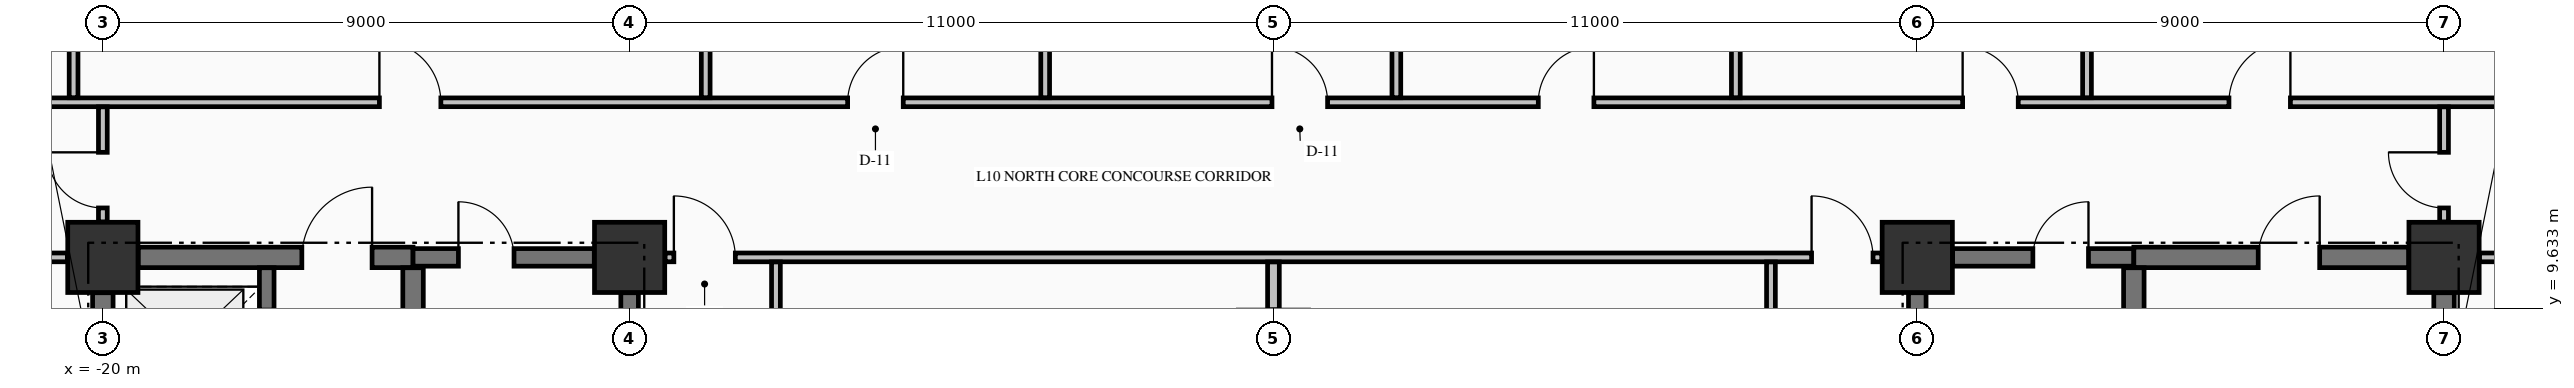
"""IFC4 building model, lengths in metres.
Left out: names, types, materials, properties, quantities, classifications, styles, units other than length and angle.
Written with IfcOpenShell. Run it as: python <this file> out.ifc"""

import sys

from ifc_helpers import new_model, si_unit, direction, frame, frame_2d, origin, origin_2d, place, context, subcontext, project, spatial, rectangle, extrude, element, fill, save


model = new_model("IFC4")
c1 = context("Model", 3, precision=1e-05, world=origin(), true_north=direction((0.0, 1.0)))
c2 = subcontext(c1, "Body", "Model", "MODEL_VIEW")
j1 = project(units=[si_unit("LENGTHUNIT", "METRE"), si_unit("PLANEANGLEUNIT", "RADIAN")], contexts=[c1])
p1 = place(None, origin())
s1 = spatial("IfcSite", under=j1, at=p1, CompositionType="ELEMENT")
p2 = place(p1, origin())
s2 = spatial("IfcBuilding", under=s1, at=p2, CompositionType="ELEMENT")
p3 = place(p2, frame((0.0, 0.0, 45.05)))
s3 = spatial("IfcBuildingStorey", under=s2, at=p3, CompositionType="ELEMENT", Elevation=45.05)
for number, where, z_axis, x_axis in (
    (1, (-20.0, 10.5, -0.25), (0.0, 0.0, 1.0), (1.0, 0.0, 0.0)),
    (2, (-11.0, 10.5, -0.25), (0.0, 0.0, 1.0), (1.0, 0.0, 0.0)),
    (3, (11.0, 10.5, -0.25), (0.0, 0.0, 1.0), (1.0, 0.0, 0.0)),
    (4, (20.0, 10.5, -0.25), (0.0, 0.0, 1.0), (1.0, 0.0, 0.0)),
):
    element("IfcColumn", number, at=place(p3, frame(where, z_axis=z_axis, x_axis=x_axis)), inside=s3, PredefinedType="COLUMN", context=c2, shape_type="SweptSolid", body=[
        extrude(rectangle(XDim=1.2, YDim=1.2, at=origin_2d()), origin(), (0.0, 0.0, 1.0), 3.57),
    ])
p4 = place(p3, frame((-19.396, 10.5, 0.0), z_axis=(0.0, 0.0, 1.0), x_axis=(1.0, 0.0, 0.0)))
e5 = element("IfcWall", 5, at=p4, inside=s3, PredefinedType="SHEAR", context=c2, shape_type="SweptSolid", body=[
    extrude(rectangle(XDim=4.696, YDim=0.35, at=frame_2d((2.348, 0.0))), origin(), (0.0, 0.0, 1.0), 3.32),
])
p5 = place(p4, frame((2.796, 0.0, 0.0)))
e6 = element("IfcOpeningElement", 6, at=p5, cuts=e5, PredefinedType="OPENING", context=c2, shape_type="SweptSolid", body=[
    extrude(rectangle(XDim=1.2, YDim=2.15, at=frame_2d((0.6, 1.075))), frame((0.0, 0.185, 0.0), z_axis=(0.0, -1.0, 0.0), x_axis=(1.0, 0.0, 0.0)), (0.0, 0.0, 1.0), 0.37),
])
p6 = place(p3, frame((-14.7, 10.5, 0.0), z_axis=(0.0, 0.0, 1.0), x_axis=(1.0, 0.0, 0.0)))
e7 = element("IfcWall", 7, at=p6, inside=s3, PredefinedType="SHEAR", context=c2, shape_type="SweptSolid", body=[
    extrude(rectangle(XDim=3.096, YDim=0.3, at=frame_2d((1.548, 0.0))), origin(), (0.0, 0.0, 1.0), 3.32),
])
p7 = place(p6, frame((0.775, 0.0, 0.0)))
e8 = element("IfcOpeningElement", 8, at=p7, cuts=e7, PredefinedType="OPENING", context=c2, shape_type="SweptSolid", body=[
    extrude(rectangle(XDim=0.95, YDim=2.15, at=frame_2d((0.475, 1.075))), frame((0.0, 0.16, 0.0), z_axis=(0.0, -1.0, 0.0), x_axis=(1.0, 0.0, 0.0)), (0.0, 0.0, 1.0), 0.32),
])
p8 = place(p3, frame((11.604, 10.5, 0.0), z_axis=(0.0, 0.0, 1.0), x_axis=(1.0, 0.0, 0.0)))
e9 = element("IfcWall", 9, at=p8, inside=s3, PredefinedType="SHEAR", context=c2, shape_type="SweptSolid", body=[
    extrude(rectangle(XDim=3.096, YDim=0.3, at=frame_2d((1.548, 0.0))), origin(), (0.0, 0.0, 1.0), 3.32),
])
p9 = place(p8, frame((1.371, 0.0, 0.0)))
e10 = element("IfcOpeningElement", 10, at=p9, cuts=e9, PredefinedType="OPENING", context=c2, shape_type="SweptSolid", body=[
    extrude(rectangle(XDim=0.95, YDim=2.15, at=frame_2d((0.475, 1.075))), frame((0.0, 0.16, 0.0), z_axis=(0.0, -1.0, 0.0), x_axis=(1.0, 0.0, 0.0)), (0.0, 0.0, 1.0), 0.32),
])
p10 = place(p3, frame((14.7, 10.5, 0.0), z_axis=(0.0, 0.0, 1.0), x_axis=(1.0, 0.0, 0.0)))
e11 = element("IfcWall", 11, at=p10, inside=s3, PredefinedType="SHEAR", context=c2, shape_type="SweptSolid", body=[
    extrude(rectangle(XDim=4.696, YDim=0.35, at=frame_2d((2.348, 0.0))), origin(), (0.0, 0.0, 1.0), 3.32),
])
p11 = place(p10, frame((2.125, 0.0, 0.0)))
e12 = element("IfcOpeningElement", 12, at=p11, cuts=e11, PredefinedType="OPENING", context=c2, shape_type="SweptSolid", body=[
    extrude(rectangle(XDim=1.05, YDim=2.15, at=frame_2d((0.525, 1.075))), frame((0.0, 0.185, 0.0), z_axis=(0.0, -1.0, 0.0), x_axis=(1.0, 0.0, 0.0)), (0.0, 0.0, 1.0), 0.37),
])
p12 = place(p3, frame((-23.835, 10.5, 0.0), z_axis=(0.0, 0.0, 1.0), x_axis=(1.0, 0.0, 0.0)))
e13 = element("IfcWall", 13, at=p12, inside=s3, PredefinedType="PARTITIONING", context=c2, shape_type="SweptSolid", body=[
    extrude(rectangle(XDim=3.229, YDim=0.15, at=frame_2d((1.615, 0.0))), origin(), (0.0, 0.0, 1.0), 3.32),
])
p13 = place(p12, frame((1.335, 0.0, 0.0)))
e14 = element("IfcOpeningElement", 14, at=p13, cuts=e13, PredefinedType="OPENING", context=c2, shape_type="SweptSolid", body=[
    extrude(rectangle(XDim=1.0, YDim=2.15, at=frame_2d((0.5, 1.075))), frame((0.0, 0.085, 0.0), z_axis=(0.0, -1.0, 0.0), x_axis=(1.0, 0.0, 0.0)), (0.0, 0.0, 1.0), 0.17),
])
p14 = place(p3, frame((-10.394, 10.5, 0.0), z_axis=(0.0, 0.0, 1.0), x_axis=(1.0, 0.0, 0.0)))
e15 = element("IfcWall", 15, at=p14, inside=s3, PredefinedType="PARTITIONING", context=c2, shape_type="SweptSolid", body=[
    extrude(rectangle(XDim=20.788, YDim=0.15, at=frame_2d((10.394, 0.0))), origin(), (0.0, 0.0, 1.0), 3.32),
])
p15 = place(p14, frame((0.15, 0.0, 0.0)))
e16 = element("IfcOpeningElement", 16, at=p15, cuts=e15, PredefinedType="OPENING", context=c2, shape_type="SweptSolid", body=[
    extrude(rectangle(XDim=1.05, YDim=2.15, at=frame_2d((0.525, 1.075))), frame((0.0, 0.085, 0.0), z_axis=(0.0, -1.0, 0.0), x_axis=(1.0, 0.0, 0.0)), (0.0, 0.0, 1.0), 0.17),
])
p16 = place(p14, frame((19.588, 0.0, 0.0)))
e17 = element("IfcOpeningElement", 17, at=p16, cuts=e15, PredefinedType="OPENING", context=c2, shape_type="SweptSolid", body=[
    extrude(rectangle(XDim=1.05, YDim=2.15, at=frame_2d((0.525, 1.075))), frame((0.0, 0.085, 0.0), z_axis=(0.0, -1.0, 0.0), x_axis=(1.0, 0.0, 0.0)), (0.0, 0.0, 1.0), 0.17),
])
p17 = place(p3, frame((20.606, 10.5, 0.0), z_axis=(0.0, 0.0, 1.0), x_axis=(1.0, 0.0, 0.0)))
e18 = element("IfcWall", 18, at=p17, inside=s3, PredefinedType="PARTITIONING", context=c2, shape_type="SweptSolid", body=[
    extrude(rectangle(XDim=8.229, YDim=0.15, at=frame_2d((4.115, 0.0))), origin(), (0.0, 0.0, 1.0), 3.32),
])
p18 = place(p17, frame((3.419, 0.0, 0.0)))
e19 = element("IfcOpeningElement", 19, at=p18, cuts=e18, PredefinedType="OPENING", context=c2, shape_type="SweptSolid", body=[
    extrude(rectangle(XDim=0.95, YDim=2.15, at=frame_2d((0.475, 1.075))), frame((0.0, 0.085, 0.0), z_axis=(0.0, -1.0, 0.0), x_axis=(1.0, 0.0, 0.0)), (0.0, 0.0, 1.0), 0.17),
])
p19 = place(p3, frame((-23.835, 13.15, 0.0), z_axis=(0.0, 0.0, 1.0), x_axis=(1.0, 0.0, 0.0)))
e20 = element("IfcWall", 20, at=p19, inside=s3, PredefinedType="PARTITIONING", context=c2, shape_type="SweptSolid", body=[
    extrude(rectangle(XDim=52.67, YDim=0.15, at=frame_2d((26.335, 0.0))), origin(), (0.0, 0.0, 1.0), 3.32),
])
p20 = place(p19, frame((8.56, 0.0, 0.0)))
e21 = element("IfcOpeningElement", 21, at=p20, cuts=e20, PredefinedType="OPENING", context=c2, shape_type="SweptSolid", body=[
    extrude(rectangle(XDim=1.05, YDim=2.15, at=frame_2d((0.525, 1.075))), frame((0.0, 0.085, 0.0), z_axis=(0.0, -1.0, 0.0), x_axis=(1.0, 0.0, 0.0)), (0.0, 0.0, 1.0), 0.17),
])
p21 = place(p19, frame((16.56, 0.0, 0.0)))
e22 = element("IfcOpeningElement", 22, at=p21, cuts=e20, PredefinedType="OPENING", context=c2, shape_type="SweptSolid", body=[
    extrude(rectangle(XDim=0.95, YDim=2.15, at=frame_2d((0.475, 1.075))), frame((0.0, 0.085, 0.0), z_axis=(0.0, -1.0, 0.0), x_axis=(1.0, 0.0, 0.0)), (0.0, 0.0, 1.0), 0.17),
])
p22 = place(p19, frame((23.81, 0.0, 0.0)))
e23 = element("IfcOpeningElement", 23, at=p22, cuts=e20, PredefinedType="OPENING", context=c2, shape_type="SweptSolid", body=[
    extrude(rectangle(XDim=0.95, YDim=2.15, at=frame_2d((0.475, 1.075))), frame((0.0, 0.085, 0.0), z_axis=(0.0, -1.0, 0.0), x_axis=(1.0, 0.0, 0.0)), (0.0, 0.0, 1.0), 0.17),
])
p23 = place(p19, frame((28.36, 0.0, 0.0)))
e24 = element("IfcOpeningElement", 24, at=p23, cuts=e20, PredefinedType="OPENING", context=c2, shape_type="SweptSolid", body=[
    extrude(rectangle(XDim=0.95, YDim=2.15, at=frame_2d((0.475, 1.075))), frame((0.0, 0.085, 0.0), z_axis=(0.0, -1.0, 0.0), x_axis=(1.0, 0.0, 0.0)), (0.0, 0.0, 1.0), 0.17),
])
p24 = place(p19, frame((35.61, 0.0, 0.0)))
e25 = element("IfcOpeningElement", 25, at=p24, cuts=e20, PredefinedType="OPENING", context=c2, shape_type="SweptSolid", body=[
    extrude(rectangle(XDim=0.95, YDim=2.15, at=frame_2d((0.475, 1.075))), frame((0.0, 0.085, 0.0), z_axis=(0.0, -1.0, 0.0), x_axis=(1.0, 0.0, 0.0)), (0.0, 0.0, 1.0), 0.17),
])
p25 = place(p19, frame((40.16, 0.0, 0.0)))
e26 = element("IfcOpeningElement", 26, at=p25, cuts=e20, PredefinedType="OPENING", context=c2, shape_type="SweptSolid", body=[
    extrude(rectangle(XDim=1.05, YDim=2.15, at=frame_2d((0.525, 1.075))), frame((0.0, 0.085, 0.0), z_axis=(0.0, -1.0, 0.0), x_axis=(1.0, 0.0, 0.0)), (0.0, 0.0, 1.0), 0.17),
])
p26 = place(p3, frame((-20.0, 7.727, 0.0), z_axis=(0.0, 0.0, 1.0), x_axis=(0.0, 1.0, 0.0)))
e27 = element("IfcWall", 27, at=p26, inside=s3, PredefinedType="SHEAR", context=c2, shape_type="SweptSolid", body=[
    extrude(rectangle(XDim=2.169, YDim=0.35, at=frame_2d((1.084, 0.0))), origin(), (0.0, 0.0, 1.0), 3.32),
])
p27 = place(p3, frame((-17.2, 7.727, 0.0), z_axis=(0.0, 0.0, 1.0), x_axis=(0.0, 1.0, 0.0)))
e28 = element("IfcWall", 28, at=p27, inside=s3, PredefinedType="SOLIDWALL", context=c2, shape_type="SweptSolid", body=[
    extrude(rectangle(XDim=2.596, YDim=0.25, at=frame_2d((1.298, 0.0))), origin(), (0.0, 0.0, 1.0), 3.32),
])
p28 = place(p27, frame((0.773, 0.0, 0.0)))
e29 = element("IfcOpeningElement", 29, at=p28, cuts=e28, PredefinedType="OPENING", context=c2, shape_type="SweptSolid", body=[
    extrude(rectangle(XDim=1.1, YDim=2.2, at=frame_2d((0.55, 1.1))), frame((0.0, 0.135, 0.0), z_axis=(0.0, -1.0, 0.0), x_axis=(1.0, 0.0, 0.0)), (0.0, 0.0, 1.0), 0.27),
])
p29 = place(p3, frame((-14.7, 5.852, 0.0), z_axis=(0.0, 0.0, 1.0), x_axis=(0.0, 1.0, 0.0)))
e30 = element("IfcWall", 30, at=p29, inside=s3, PredefinedType="SHEAR", context=c2, shape_type="SweptSolid", body=[
    extrude(rectangle(XDim=4.471, YDim=0.35, at=frame_2d((2.235, 0.0))), origin(), (0.0, 0.0, 1.0), 3.32),
])
for number, where, z_axis, x_axis in (
    (31, (-11.0, 5.852, 0.0), (0.0, 0.0, 1.0), (0.0, 1.0, 0.0)),
    (32, (11.0, 5.852, 0.0), (0.0, 0.0, 1.0), (0.0, 1.0, 0.0)),
):
    element("IfcWall", number, at=place(p3, frame(where, z_axis=z_axis, x_axis=x_axis)), inside=s3, PredefinedType="SHEAR", context=c2, shape_type="SweptSolid", body=[
        extrude(rectangle(XDim=4.044, YDim=0.3, at=frame_2d((2.022, 0.0))), origin(), (0.0, 0.0, 1.0), 3.32),
    ])
p30 = place(p3, frame((14.7, 5.852, 0.0), z_axis=(0.0, 0.0, 1.0), x_axis=(0.0, 1.0, 0.0)))
e33 = element("IfcWall", 33, at=p30, inside=s3, PredefinedType="SHEAR", context=c2, shape_type="SweptSolid", body=[
    extrude(rectangle(XDim=4.471, YDim=0.35, at=frame_2d((2.235, 0.0))), origin(), (0.0, 0.0, 1.0), 3.32),
])
p31 = place(p3, frame((20.0, 0.604, 0.0), z_axis=(0.0, 0.0, 1.0), x_axis=(0.0, 1.0, 0.0)))
e34 = element("IfcWall", 34, at=p31, inside=s3, PredefinedType="SHEAR", context=c2, shape_type="SweptSolid", body=[
    extrude(rectangle(XDim=9.292, YDim=0.35, at=frame_2d((4.646, 0.0))), origin(), (0.0, 0.0, 1.0), 3.32),
])
p32 = place(p3, frame((-20.5, 13.228, 0.0), z_axis=(0.0, 0.0, 1.0), x_axis=(0.0, 1.0, 0.0)))
e35 = element("IfcWall", 35, at=p32, inside=s3, PredefinedType="PARTITIONING", context=c2, shape_type="SweptSolid", body=[
    extrude(rectangle(XDim=9.066, YDim=0.15, at=frame_2d((4.533, 0.0))), origin(), (0.0, 0.0, 1.0), 3.32),
])
p33 = place(p3, frame((-20.0, 11.106, 0.0), z_axis=(0.0, 0.0, 1.0), x_axis=(0.0, 1.0, 0.0)))
e36 = element("IfcWall", 36, at=p33, inside=s3, PredefinedType="PARTITIONING", context=c2, shape_type="SweptSolid", body=[
    extrude(rectangle(XDim=1.966, YDim=0.15, at=frame_2d((0.983, 0.0))), origin(), (0.0, 0.0, 1.0), 3.32),
])
p34 = place(p33, frame((0.239, 0.0, 0.0)))
e37 = element("IfcOpeningElement", 37, at=p34, cuts=e36, PredefinedType="OPENING", context=c2, shape_type="SweptSolid", body=[
    extrude(rectangle(XDim=0.95, YDim=2.15, at=frame_2d((0.475, 1.075))), frame((0.0, 0.085, 0.0), z_axis=(0.0, -1.0, 0.0), x_axis=(1.0, 0.0, 0.0)), (0.0, 0.0, 1.0), 0.17),
])
p35 = place(p3, frame((-9.7, 13.228, 0.0), z_axis=(0.0, 0.0, 1.0), x_axis=(0.0, 1.0, 0.0)))
e38 = element("IfcWall", 38, at=p35, inside=s3, PredefinedType="PARTITIONING", context=c2, shape_type="SweptSolid", body=[
    extrude(rectangle(XDim=13.107, YDim=0.15, at=frame_2d((6.553, 0.0))), origin(), (0.0, 0.0, 1.0), 3.32),
])
p36 = place(p3, frame((-8.5, -1.297, 0.0), z_axis=(0.0, 0.0, 1.0), x_axis=(0.0, 1.0, 0.0)))
e39 = element("IfcWall", 39, at=p36, inside=s3, PredefinedType="PARTITIONING", context=c2, shape_type="SweptSolid", body=[
    extrude(rectangle(XDim=11.719, YDim=0.15, at=frame_2d((5.86, 0.0))), origin(), (0.0, 0.0, 1.0), 3.32),
])
p37 = place(p36, frame((5.322, 0.0, 0.0)))
e40 = element("IfcOpeningElement", 40, at=p37, cuts=e39, PredefinedType="OPENING", context=c2, shape_type="SweptSolid", body=[
    extrude(rectangle(XDim=1.05, YDim=2.15, at=frame_2d((0.525, 1.075))), frame((0.0, 0.085, 0.0), z_axis=(0.0, -1.0, 0.0), x_axis=(1.0, 0.0, 0.0)), (0.0, 0.0, 1.0), 0.17),
])
p38 = place(p3, frame((-3.9, 13.228, 0.0), z_axis=(0.0, 0.0, 1.0), x_axis=(0.0, 1.0, 0.0)))
e41 = element("IfcWall", 41, at=p38, inside=s3, PredefinedType="PARTITIONING", context=c2, shape_type="SweptSolid", body=[
    extrude(rectangle(XDim=13.107, YDim=0.15, at=frame_2d((6.553, 0.0))), origin(), (0.0, 0.0, 1.0), 3.32),
])
p39 = place(p3, frame((0.0, 9.606, 0.0), z_axis=(0.0, 0.0, 1.0), x_axis=(0.0, 1.0, 0.0)))
e42 = element("IfcWall", 42, at=p39, inside=s3, PredefinedType="PARTITIONING", context=c2, shape_type="SweptSolid", body=[
    extrude(rectangle(XDim=0.816, YDim=0.2, at=frame_2d((0.408, 0.0))), origin(), (0.0, 0.0, 1.0), 2.66),
])
for number, where, z_axis, x_axis in (
    (43, (2.1, 13.228, 0.0), (0.0, 0.0, 1.0), (0.0, 1.0, 0.0)),
    (44, (7.9, 13.228, 0.0), (0.0, 0.0, 1.0), (0.0, 1.0, 0.0)),
):
    element("IfcWall", number, at=place(p3, frame(where, z_axis=z_axis, x_axis=x_axis)), inside=s3, PredefinedType="PARTITIONING", context=c2, shape_type="SweptSolid", body=[
        extrude(rectangle(XDim=13.107, YDim=0.15, at=frame_2d((6.553, 0.0))), origin(), (0.0, 0.0, 1.0), 3.32),
    ])
p40 = place(p3, frame((8.5, 0.303, 0.0), z_axis=(0.0, 0.0, 1.0), x_axis=(0.0, 1.0, 0.0)))
e45 = element("IfcWall", 45, at=p40, inside=s3, PredefinedType="PARTITIONING", context=c2, shape_type="SweptSolid", body=[
    extrude(rectangle(XDim=10.119, YDim=0.15, at=frame_2d((5.06, 0.0))), origin(), (0.0, 0.0, 1.0), 3.32),
])
p41 = place(p40, frame((4.497, 0.0, 0.0)))
e46 = element("IfcOpeningElement", 46, at=p41, cuts=e45, PredefinedType="OPENING", context=c2, shape_type="SweptSolid", body=[
    extrude(rectangle(XDim=1.1, YDim=2.15, at=frame_2d((0.55, 1.075))), frame((0.0, 0.085, 0.0), z_axis=(0.0, -1.0, 0.0), x_axis=(1.0, 0.0, 0.0)), (0.0, 0.0, 1.0), 0.17),
])
p42 = place(p3, frame((13.9, 13.228, 0.0), z_axis=(0.0, 0.0, 1.0), x_axis=(0.0, 1.0, 0.0)))
e47 = element("IfcWall", 47, at=p42, inside=s3, PredefinedType="PARTITIONING", context=c2, shape_type="SweptSolid", body=[
    extrude(rectangle(XDim=13.107, YDim=0.15, at=frame_2d((6.553, 0.0))), origin(), (0.0, 0.0, 1.0), 3.32),
])
p43 = place(p3, frame((20.0, 11.106, 0.0), z_axis=(0.0, 0.0, 1.0), x_axis=(0.0, 1.0, 0.0)))
e48 = element("IfcWall", 48, at=p43, inside=s3, PredefinedType="PARTITIONING", context=c2, shape_type="SweptSolid", body=[
    extrude(rectangle(XDim=1.966, YDim=0.15, at=frame_2d((0.983, 0.0))), origin(), (0.0, 0.0, 1.0), 2.66),
])
p44 = place(p43, frame((0.239, 0.0, 0.0)))
e49 = element("IfcOpeningElement", 49, at=p44, cuts=e48, PredefinedType="OPENING", context=c2, shape_type="SweptSolid", body=[
    extrude(rectangle(XDim=0.95, YDim=2.15, at=frame_2d((0.475, 1.075))), frame((0.0, 0.085, 0.0), z_axis=(0.0, -1.0, 0.0), x_axis=(1.0, 0.0, 0.0)), (0.0, 0.0, 1.0), 0.17),
])
p45 = place(p7, origin())
e50 = element("IfcDoor", 50, at=p45, inside=s3, OperationType="SINGLE_SWING_LEFT", PredefinedType="DOOR", context=c2, shape_type="SweptSolid", body=[
    extrude(rectangle(XDim=0.95, YDim=2.15, at=frame_2d((0.475, 1.075))), frame((0.0, 0.025, 0.0), z_axis=(0.0, -1.0, 0.0), x_axis=(1.0, 0.0, 0.0)), (0.0, 0.0, 1.0), 0.05),
])
fill(e8, e50)
p46 = place(p9, origin())
e51 = element("IfcDoor", 51, at=p46, inside=s3, OperationType="SINGLE_SWING_RIGHT", PredefinedType="DOOR", context=c2, shape_type="SweptSolid", body=[
    extrude(rectangle(XDim=0.95, YDim=2.15, at=frame_2d((0.475, 1.075))), frame((0.0, 0.025, 0.0), z_axis=(0.0, -1.0, 0.0), x_axis=(1.0, 0.0, 0.0)), (0.0, 0.0, 1.0), 0.05),
])
fill(e10, e51)
p47 = place(p5, origin())
e52 = element("IfcDoor", 52, at=p47, inside=s3, OperationType="SINGLE_SWING_RIGHT", PredefinedType="DOOR", context=c2, shape_type="SweptSolid", body=[
    extrude(rectangle(XDim=1.2, YDim=2.15, at=frame_2d((0.6, 1.075))), frame((0.0, 0.025, 0.0), z_axis=(0.0, -1.0, 0.0), x_axis=(1.0, 0.0, 0.0)), (0.0, 0.0, 1.0), 0.05),
])
fill(e6, e52)
p48 = place(p11, origin())
e53 = element("IfcDoor", 53, at=p48, inside=s3, OperationType="SINGLE_SWING_RIGHT", PredefinedType="DOOR", context=c2, shape_type="SweptSolid", body=[
    extrude(rectangle(XDim=1.05, YDim=2.15, at=frame_2d((0.525, 1.075))), frame((0.0, 0.025, 0.0), z_axis=(0.0, -1.0, 0.0), x_axis=(1.0, 0.0, 0.0)), (0.0, 0.0, 1.0), 0.05),
])
fill(e12, e53)
p49 = place(p15, origin())
e54 = element("IfcDoor", 54, at=p49, inside=s3, OperationType="SINGLE_SWING_LEFT", PredefinedType="DOOR", context=c2, shape_type="SweptSolid", body=[
    extrude(rectangle(XDim=1.05, YDim=2.15, at=frame_2d((0.525, 1.075))), frame((0.0, 0.025, 0.0), z_axis=(0.0, -1.0, 0.0), x_axis=(1.0, 0.0, 0.0)), (0.0, 0.0, 1.0), 0.05),
])
fill(e16, e54)
p50 = place(p16, origin())
e55 = element("IfcDoor", 55, at=p50, inside=s3, OperationType="SINGLE_SWING_LEFT", PredefinedType="DOOR", context=c2, shape_type="SweptSolid", body=[
    extrude(rectangle(XDim=1.05, YDim=2.15, at=frame_2d((0.525, 1.075))), frame((0.0, 0.025, 0.0), z_axis=(0.0, -1.0, 0.0), x_axis=(1.0, 0.0, 0.0)), (0.0, 0.0, 1.0), 0.05),
])
fill(e17, e55)
p51 = place(p20, origin())
e56 = element("IfcDoor", 56, at=p51, inside=s3, OperationType="SINGLE_SWING_LEFT", PredefinedType="DOOR", context=c2, shape_type="SweptSolid", body=[
    extrude(rectangle(XDim=1.05, YDim=2.15, at=frame_2d((0.525, 1.075))), frame((0.0, 0.025, 0.0), z_axis=(0.0, -1.0, 0.0), x_axis=(1.0, 0.0, 0.0)), (0.0, 0.0, 1.0), 0.05),
])
fill(e21, e56)
p52 = place(p21, origin())
e57 = element("IfcDoor", 57, at=p52, inside=s3, OperationType="SINGLE_SWING_RIGHT", PredefinedType="DOOR", context=c2, shape_type="SweptSolid", body=[
    extrude(rectangle(XDim=0.95, YDim=2.15, at=frame_2d((0.475, 1.075))), frame((0.0, 0.025, 0.0), z_axis=(0.0, -1.0, 0.0), x_axis=(1.0, 0.0, 0.0)), (0.0, 0.0, 1.0), 0.05),
])
fill(e22, e57)
p53 = place(p22, origin())
e58 = element("IfcDoor", 58, at=p53, inside=s3, OperationType="SINGLE_SWING_LEFT", PredefinedType="DOOR", context=c2, shape_type="SweptSolid", body=[
    extrude(rectangle(XDim=0.95, YDim=2.15, at=frame_2d((0.475, 1.075))), frame((0.0, 0.025, 0.0), z_axis=(0.0, -1.0, 0.0), x_axis=(1.0, 0.0, 0.0)), (0.0, 0.0, 1.0), 0.05),
])
fill(e23, e58)
p54 = place(p23, origin())
e59 = element("IfcDoor", 59, at=p54, inside=s3, OperationType="SINGLE_SWING_RIGHT", PredefinedType="DOOR", context=c2, shape_type="SweptSolid", body=[
    extrude(rectangle(XDim=0.95, YDim=2.15, at=frame_2d((0.475, 1.075))), frame((0.0, 0.025, 0.0), z_axis=(0.0, -1.0, 0.0), x_axis=(1.0, 0.0, 0.0)), (0.0, 0.0, 1.0), 0.05),
])
fill(e24, e59)
p55 = place(p24, origin())
e60 = element("IfcDoor", 60, at=p55, inside=s3, OperationType="SINGLE_SWING_LEFT", PredefinedType="DOOR", context=c2, shape_type="SweptSolid", body=[
    extrude(rectangle(XDim=0.95, YDim=2.15, at=frame_2d((0.475, 1.075))), frame((0.0, 0.025, 0.0), z_axis=(0.0, -1.0, 0.0), x_axis=(1.0, 0.0, 0.0)), (0.0, 0.0, 1.0), 0.05),
])
fill(e25, e60)
p56 = place(p25, origin())
e61 = element("IfcDoor", 61, at=p56, inside=s3, OperationType="SINGLE_SWING_RIGHT", PredefinedType="DOOR", context=c2, shape_type="SweptSolid", body=[
    extrude(rectangle(XDim=1.05, YDim=2.15, at=frame_2d((0.525, 1.075))), frame((0.0, 0.025, 0.0), z_axis=(0.0, -1.0, 0.0), x_axis=(1.0, 0.0, 0.0)), (0.0, 0.0, 1.0), 0.05),
])
fill(e26, e61)
p57 = place(p34, origin())
e62 = element("IfcDoor", 62, at=p57, inside=s3, OperationType="SINGLE_SWING_RIGHT", PredefinedType="DOOR", context=c2, shape_type="SweptSolid", body=[
    extrude(rectangle(XDim=0.95, YDim=2.15, at=frame_2d((0.475, 1.075))), frame((0.0, 0.025, 0.0), z_axis=(0.0, -1.0, 0.0), x_axis=(1.0, 0.0, 0.0)), (0.0, 0.0, 1.0), 0.05),
])
fill(e37, e62)
p58 = place(p44, origin())
e63 = element("IfcDoor", 63, at=p58, inside=s3, OperationType="SINGLE_SWING_RIGHT", PredefinedType="DOOR", context=c2, shape_type="SweptSolid", body=[
    extrude(rectangle(XDim=0.95, YDim=2.15, at=frame_2d((0.475, 1.075))), frame((0.0, 0.025, 0.0), z_axis=(0.0, -1.0, 0.0), x_axis=(1.0, 0.0, 0.0)), (0.0, 0.0, 1.0), 0.05),
])
fill(e49, e63)
save(model, sys.argv[1])
